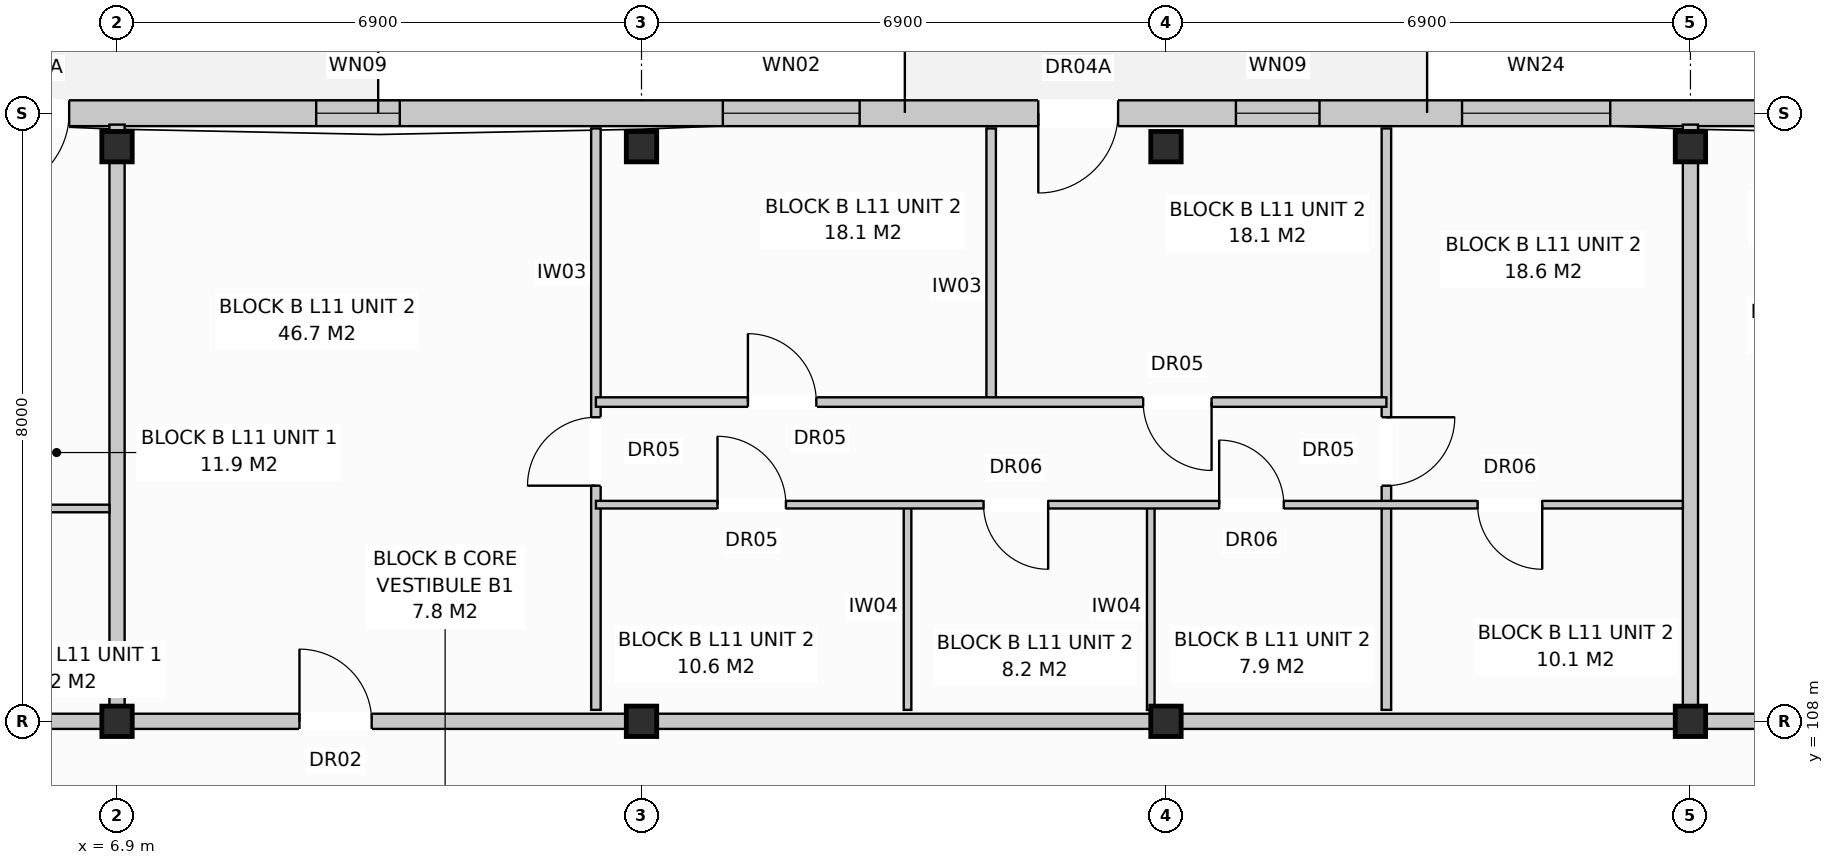
"""IFC4 building model, lengths in metres.
Left out: names, types, materials, properties, quantities, classifications, styles, units other than length and angle.
Written with IfcOpenShell. Run it as: python <this file> out.ifc"""

import sys

from ifc_helpers import new_model, si_unit, direction, frame, frame_2d, origin, origin_with_axes, origin_2d, place, context, subcontext, project, spatial, rectangle, extrude, element, fill, save


model = new_model("IFC4")
c1 = context("Model", 3, precision=1e-05, world=origin(), true_north=direction((0.0, 1.0)))
c2 = subcontext(c1, "Body", "Model", "MODEL_VIEW")
j1 = project(units=[si_unit("LENGTHUNIT", "METRE"), si_unit("PLANEANGLEUNIT", "RADIAN")], contexts=[c1])
p1 = place(None, origin())
s1 = spatial("IfcSite", under=j1, at=p1, CompositionType="ELEMENT")
p2 = place(p1, origin())
s2 = spatial("IfcBuilding", under=s1, at=p2, CompositionType="ELEMENT")
p3 = place(p2, frame((0.0, 0.0, 36.8)))
s3 = spatial("IfcBuildingStorey", under=s2, at=p3, CompositionType="ELEMENT", Elevation=36.8)
for number, where, z_axis, x_axis in (
    (1, (6.9, 108.0, 0.0), (0.0, 0.0, 1.0), (1.0, 0.0, 0.0)),
    (2, (6.9, 115.56, 0.0), (0.0, 0.0, 1.0), (1.0, 0.0, 0.0)),
    (3, (13.8, 108.0, 0.0), (0.0, 0.0, 1.0), (1.0, 0.0, 0.0)),
    (4, (13.8, 115.56, 0.0), (0.0, 0.0, 1.0), (1.0, 0.0, 0.0)),
    (5, (20.7, 108.0, 0.0), (0.0, 0.0, 1.0), (1.0, 0.0, 0.0)),
    (6, (20.7, 115.56, 0.0), (0.0, 0.0, 1.0), (1.0, 0.0, 0.0)),
    (7, (27.6, 108.0, 0.0), (0.0, 0.0, 1.0), (1.0, 0.0, 0.0)),
    (8, (27.6, 115.56, 0.0), (0.0, 0.0, 1.0), (1.0, 0.0, 0.0)),
):
    element("IfcColumn", number, at=place(p3, frame(where, z_axis=z_axis, x_axis=x_axis)), inside=s3, PredefinedType="COLUMN", context=c2, shape_type="SweptSolid", body=[
        extrude(rectangle(XDim=0.4, YDim=0.4, at=origin_2d()), origin(), (0.0, 0.0, 1.0), 3.2),
    ])
p4 = place(p3, frame((0.16, 116.0, 0.0), z_axis=(0.0, 0.0, 1.0), x_axis=(1.0, 0.0, 0.0)))
e9 = element("IfcWall", 9, at=p4, inside=s3, PredefinedType="STANDARD", context=c2, shape_type="SweptSolid", body=[
    extrude(rectangle(XDim=41.08, YDim=0.34, at=frame_2d((20.54, 0.0))), origin(), (0.0, 0.0, 1.0), 2.97),
])
p5 = place(p4, frame((5.06, 0.0, 0.0)))
e10 = element("IfcOpeningElement", 10, at=p5, cuts=e9, PredefinedType="OPENING", context=c2, shape_type="SweptSolid", body=[
    extrude(rectangle(XDim=1.05, YDim=2.12, at=frame_2d((0.525, 1.06))), frame((0.0, 0.182, 0.0), z_axis=(0.0, -1.0, 0.0), x_axis=(1.0, 0.0, 0.0)), (0.0, 0.0, 1.0), 0.364),
])
p6 = place(p4, frame((18.86, 0.0, 0.0)))
e11 = element("IfcOpeningElement", 11, at=p6, cuts=e9, PredefinedType="OPENING", context=c2, shape_type="SweptSolid", body=[
    extrude(rectangle(XDim=1.05, YDim=2.12, at=frame_2d((0.525, 1.06))), frame((0.0, 0.182, 0.0), z_axis=(0.0, -1.0, 0.0), x_axis=(1.0, 0.0, 0.0)), (0.0, 0.0, 1.0), 0.364),
])
p7 = place(p4, frame((31.375, 0.0, 0.0)))
e12 = element("IfcOpeningElement", 12, at=p7, cuts=e9, PredefinedType="OPENING", context=c2, shape_type="SweptSolid", body=[
    extrude(rectangle(XDim=1.05, YDim=2.12, at=frame_2d((0.525, 1.06))), frame((0.0, 0.182, 0.0), z_axis=(0.0, -1.0, 0.0), x_axis=(1.0, 0.0, 0.0)), (0.0, 0.0, 1.0), 0.364),
])
p8 = place(p4, frame((1.06, 0.0, 0.8)))
e13 = element("IfcOpeningElement", 13, at=p8, cuts=e9, PredefinedType="OPENING", context=c2, shape_type="SweptSolid", body=[
    extrude(rectangle(XDim=1.9, YDim=1.85, at=frame_2d((0.95, 0.925))), frame((0.0, 0.182, 0.0), z_axis=(0.0, -1.0, 0.0), x_axis=(1.0, 0.0, 0.0)), (0.0, 0.0, 1.0), 0.364),
])
p9 = place(p4, frame((9.36, 0.0, 0.72)))
e14 = element("IfcOpeningElement", 14, at=p9, cuts=e9, PredefinedType="OPENING", context=c2, shape_type="SweptSolid", body=[
    extrude(rectangle(XDim=1.1, YDim=1.5, at=frame_2d((0.55, 0.75))), frame((0.0, 0.182, 0.0), z_axis=(0.0, -1.0, 0.0), x_axis=(1.0, 0.0, 0.0)), (0.0, 0.0, 1.0), 0.364),
])
p10 = place(p4, frame((14.71, 0.0, 0.8)))
e15 = element("IfcOpeningElement", 15, at=p10, cuts=e9, PredefinedType="OPENING", context=c2, shape_type="SweptSolid", body=[
    extrude(rectangle(XDim=1.8, YDim=1.7, at=frame_2d((0.9, 0.85))), frame((0.0, 0.182, 0.0), z_axis=(0.0, -1.0, 0.0), x_axis=(1.0, 0.0, 0.0)), (0.0, 0.0, 1.0), 0.364),
])
p11 = place(p4, frame((21.46, 0.0, 0.72)))
e16 = element("IfcOpeningElement", 16, at=p11, cuts=e9, PredefinedType="OPENING", context=c2, shape_type="SweptSolid", body=[
    extrude(rectangle(XDim=1.1, YDim=1.5, at=frame_2d((0.55, 0.75))), frame((0.0, 0.182, 0.0), z_axis=(0.0, -1.0, 0.0), x_axis=(1.0, 0.0, 0.0)), (0.0, 0.0, 1.0), 0.364),
])
p12 = place(p4, frame((24.435, 0.0, 0.8)))
e17 = element("IfcOpeningElement", 17, at=p12, cuts=e9, PredefinedType="OPENING", context=c2, shape_type="SweptSolid", body=[
    extrude(rectangle(XDim=1.95, YDim=1.65, at=frame_2d((0.975, 0.825))), frame((0.0, 0.182, 0.0), z_axis=(0.0, -1.0, 0.0), x_axis=(1.0, 0.0, 0.0)), (0.0, 0.0, 1.0), 0.364),
])
p13 = place(p4, frame((29.21, 0.0, 0.8)))
e18 = element("IfcOpeningElement", 18, at=p13, cuts=e9, PredefinedType="OPENING", context=c2, shape_type="SweptSolid", body=[
    extrude(rectangle(XDim=1.8, YDim=1.7, at=frame_2d((0.9, 0.85))), frame((0.0, 0.182, 0.0), z_axis=(0.0, -1.0, 0.0), x_axis=(1.0, 0.0, 0.0)), (0.0, 0.0, 1.0), 0.364),
])
p14 = place(p4, frame((35.26, 0.0, 0.72)))
e19 = element("IfcOpeningElement", 19, at=p14, cuts=e9, PredefinedType="OPENING", context=c2, shape_type="SweptSolid", body=[
    extrude(rectangle(XDim=1.1, YDim=1.5, at=frame_2d((0.55, 0.75))), frame((0.0, 0.182, 0.0), z_axis=(0.0, -1.0, 0.0), x_axis=(1.0, 0.0, 0.0)), (0.0, 0.0, 1.0), 0.364),
])
p15 = place(p4, frame((38.035, 0.0, 0.8)))
e20 = element("IfcOpeningElement", 20, at=p15, cuts=e9, PredefinedType="OPENING", context=c2, shape_type="SweptSolid", body=[
    extrude(rectangle(XDim=1.95, YDim=1.65, at=frame_2d((0.975, 0.825))), frame((0.0, 0.182, 0.0), z_axis=(0.0, -1.0, 0.0), x_axis=(1.0, 0.0, 0.0)), (0.0, 0.0, 1.0), 0.364),
])
p16 = place(p3, frame((6.9, 108.15, 0.0), z_axis=(0.0, 0.0, 1.0), x_axis=(0.0, 1.0, 0.0)))
e21 = element("IfcWall", 21, at=p16, inside=s3, PredefinedType="PARTITIONING", context=c2, shape_type="SweptSolid", body=[
    extrude(rectangle(XDim=7.7, YDim=0.2, at=frame_2d((3.85, 0.0))), origin(), (0.0, 0.0, 1.0), 2.41),
])
p17 = place(p3, frame((0.0, 108.0, 0.0), z_axis=(0.0, 0.0, 1.0), x_axis=(1.0, 0.0, 0.0)))
e22 = element("IfcWall", 22, at=p17, inside=s3, PredefinedType="PARTITIONING", context=c2, shape_type="SweptSolid", body=[
    extrude(rectangle(XDim=6.9, YDim=0.2, at=frame_2d((3.45, 0.0))), origin(), (0.0, 0.0, 1.0), 2.41),
])
p18 = place(p17, frame((2.0, 0.0, 0.0)))
e23 = element("IfcOpeningElement", 23, at=p18, cuts=e22, PredefinedType="OPENING", context=c2, shape_type="SweptSolid", body=[
    extrude(rectangle(XDim=0.95, YDim=2.15, at=frame_2d((0.475, 1.075))), frame((0.0, 0.112, 0.0), z_axis=(0.0, -1.0, 0.0), x_axis=(1.0, 0.0, 0.0)), (0.0, 0.0, 1.0), 0.224),
])
p19 = place(p3, frame((4.3, 110.8, 0.0), z_axis=(0.0, 0.0, 1.0), x_axis=(1.0, 0.0, 0.0)))
e24 = element("IfcWall", 24, at=p19, inside=s3, PredefinedType="PARTITIONING", context=c2, shape_type="SweptSolid", body=[
    extrude(rectangle(XDim=2.5, YDim=0.1, at=frame_2d((1.25, 0.0))), origin(), (0.0, 0.0, 1.0), 2.97),
])
p20 = place(p3, frame((27.6, 108.15, 0.0), z_axis=(0.0, 0.0, 1.0), x_axis=(0.0, 1.0, 0.0)))
e25 = element("IfcWall", 25, at=p20, inside=s3, PredefinedType="PARTITIONING", context=c2, shape_type="SweptSolid", body=[
    extrude(rectangle(XDim=7.7, YDim=0.2, at=frame_2d((3.85, 0.0))), origin(), (0.0, 0.0, 1.0), 2.97),
])
p21 = place(p3, frame((6.9, 108.0, 0.0), z_axis=(0.0, 0.0, 1.0), x_axis=(1.0, 0.0, 0.0)))
e26 = element("IfcWall", 26, at=p21, inside=s3, PredefinedType="PARTITIONING", context=c2, shape_type="SweptSolid", body=[
    extrude(rectangle(XDim=20.7, YDim=0.2, at=frame_2d((10.35, 0.0))), origin(), (0.0, 0.0, 1.0), 2.41),
])
p22 = place(p21, frame((2.4, 0.0, 0.0)))
e27 = element("IfcOpeningElement", 27, at=p22, cuts=e26, PredefinedType="OPENING", context=c2, shape_type="SweptSolid", body=[
    extrude(rectangle(XDim=0.95, YDim=2.15, at=frame_2d((0.475, 1.075))), frame((0.0, 0.112, 0.0), z_axis=(0.0, -1.0, 0.0), x_axis=(1.0, 0.0, 0.0)), (0.0, 0.0, 1.0), 0.224),
])
p23 = place(p3, frame((13.2, 108.15, 0.0), z_axis=(0.0, 0.0, 1.0), x_axis=(0.0, 1.0, 0.0)))
e28 = element("IfcWall", 28, at=p23, inside=s3, PredefinedType="PARTITIONING", context=c2, shape_type="SweptSolid", body=[
    extrude(rectangle(XDim=7.65, YDim=0.125, at=frame_2d((3.825, 0.0))), origin(), (0.0, 0.0, 1.0), 2.97),
])
p24 = place(p23, frame((2.95, 0.0, 0.0)))
e29 = element("IfcOpeningElement", 29, at=p24, cuts=e28, PredefinedType="OPENING", context=c2, shape_type="SweptSolid", body=[
    extrude(rectangle(XDim=0.9, YDim=2.1, at=frame_2d((0.45, 1.05))), frame((0.0, 0.074, 0.0), z_axis=(0.0, -1.0, 0.0), x_axis=(1.0, 0.0, 0.0)), (0.0, 0.0, 1.0), 0.149),
])
for number, where, z_axis, x_axis in (
    (30, (17.3, 108.15, 0.0), (0.0, 0.0, 1.0), (0.0, 1.0, 0.0)),
    (31, (20.5, 108.15, 0.0), (0.0, 0.0, 1.0), (0.0, 1.0, 0.0)),
):
    element("IfcWall", number, at=place(p3, frame(where, z_axis=z_axis, x_axis=x_axis)), inside=s3, PredefinedType="PARTITIONING", context=c2, shape_type="SweptSolid", body=[
        extrude(rectangle(XDim=2.7, YDim=0.1, at=frame_2d((1.35, 0.0))), origin(), (0.0, 0.0, 1.0), 2.97),
    ])
p25 = place(p3, frame((18.4, 112.2, 0.0), z_axis=(0.0, 0.0, 1.0), x_axis=(0.0, 1.0, 0.0)))
e32 = element("IfcWall", 32, at=p25, inside=s3, PredefinedType="PARTITIONING", context=c2, shape_type="SweptSolid", body=[
    extrude(rectangle(XDim=3.6, YDim=0.125, at=frame_2d((1.8, 0.0))), origin(), (0.0, 0.0, 1.0), 2.59),
])
p26 = place(p3, frame((23.6, 108.15, 0.0), z_axis=(0.0, 0.0, 1.0), x_axis=(0.0, 1.0, 0.0)))
e33 = element("IfcWall", 33, at=p26, inside=s3, PredefinedType="PARTITIONING", context=c2, shape_type="SweptSolid", body=[
    extrude(rectangle(XDim=7.65, YDim=0.125, at=frame_2d((3.825, 0.0))), origin(), (0.0, 0.0, 1.0), 2.97),
])
p27 = place(p26, frame((2.95, 0.0, 0.0)))
e34 = element("IfcOpeningElement", 34, at=p27, cuts=e33, PredefinedType="OPENING", context=c2, shape_type="SweptSolid", body=[
    extrude(rectangle(XDim=0.9, YDim=2.1, at=frame_2d((0.45, 1.05))), frame((0.0, 0.074, 0.0), z_axis=(0.0, -1.0, 0.0), x_axis=(1.0, 0.0, 0.0)), (0.0, 0.0, 1.0), 0.149),
])
p28 = place(p3, frame((13.2, 110.85, 0.0), z_axis=(0.0, 0.0, 1.0), x_axis=(1.0, 0.0, 0.0)))
e35 = element("IfcWall", 35, at=p28, inside=s3, PredefinedType="PARTITIONING", context=c2, shape_type="SweptSolid", body=[
    extrude(rectangle(XDim=14.3, YDim=0.1, at=frame_2d((7.15, 0.0))), origin(), (0.0, 0.0, 1.0), 2.97),
])
p29 = place(p28, frame((1.6, 0.0, 0.0)))
e36 = element("IfcOpeningElement", 36, at=p29, cuts=e35, PredefinedType="OPENING", context=c2, shape_type="SweptSolid", body=[
    extrude(rectangle(XDim=0.9, YDim=2.1, at=frame_2d((0.45, 1.05))), frame((0.0, 0.062, 0.0), z_axis=(0.0, -1.0, 0.0), x_axis=(1.0, 0.0, 0.0)), (0.0, 0.0, 1.0), 0.124),
])
p30 = place(p28, frame((5.1, 0.0, 0.0)))
e37 = element("IfcOpeningElement", 37, at=p30, cuts=e35, PredefinedType="OPENING", context=c2, shape_type="SweptSolid", body=[
    extrude(rectangle(XDim=0.85, YDim=2.05, at=frame_2d((0.425, 1.025))), frame((0.0, 0.062, 0.0), z_axis=(0.0, -1.0, 0.0), x_axis=(1.0, 0.0, 0.0)), (0.0, 0.0, 1.0), 0.124),
])
p31 = place(p28, frame((8.2, 0.0, 0.0)))
e38 = element("IfcOpeningElement", 38, at=p31, cuts=e35, PredefinedType="OPENING", context=c2, shape_type="SweptSolid", body=[
    extrude(rectangle(XDim=0.85, YDim=2.05, at=frame_2d((0.425, 1.025))), frame((0.0, 0.062, 0.0), z_axis=(0.0, -1.0, 0.0), x_axis=(1.0, 0.0, 0.0)), (0.0, 0.0, 1.0), 0.124),
])
p32 = place(p28, frame((11.6, 0.0, 0.0)))
e39 = element("IfcOpeningElement", 39, at=p32, cuts=e35, PredefinedType="OPENING", context=c2, shape_type="SweptSolid", body=[
    extrude(rectangle(XDim=0.85, YDim=2.05, at=frame_2d((0.425, 1.025))), frame((0.0, 0.062, 0.0), z_axis=(0.0, -1.0, 0.0), x_axis=(1.0, 0.0, 0.0)), (0.0, 0.0, 1.0), 0.124),
])
p33 = place(p3, frame((13.2, 112.2, 0.0), z_axis=(0.0, 0.0, 1.0), x_axis=(1.0, 0.0, 0.0)))
e40 = element("IfcWall", 40, at=p33, inside=s3, PredefinedType="PARTITIONING", context=c2, shape_type="SweptSolid", body=[
    extrude(rectangle(XDim=10.4, YDim=0.125, at=frame_2d((5.2, 0.0))), origin(), (0.0, 0.0, 1.0), 2.97),
])
p34 = place(p33, frame((2.0, 0.0, 0.0)))
e41 = element("IfcOpeningElement", 41, at=p34, cuts=e40, PredefinedType="OPENING", context=c2, shape_type="SweptSolid", body=[
    extrude(rectangle(XDim=0.9, YDim=2.1, at=frame_2d((0.45, 1.05))), frame((0.0, 0.074, 0.0), z_axis=(0.0, -1.0, 0.0), x_axis=(1.0, 0.0, 0.0)), (0.0, 0.0, 1.0), 0.149),
])
p35 = place(p33, frame((7.2, 0.0, 0.0)))
e42 = element("IfcOpeningElement", 42, at=p35, cuts=e40, PredefinedType="OPENING", context=c2, shape_type="SweptSolid", body=[
    extrude(rectangle(XDim=0.9, YDim=2.1, at=frame_2d((0.45, 1.05))), frame((0.0, 0.074, 0.0), z_axis=(0.0, -1.0, 0.0), x_axis=(1.0, 0.0, 0.0)), (0.0, 0.0, 1.0), 0.149),
])
p36 = place(p3, frame((27.6, 108.0, 0.0), z_axis=(0.0, 0.0, 1.0), x_axis=(1.0, 0.0, 0.0)))
e43 = element("IfcWall", 43, at=p36, inside=s3, PredefinedType="PARTITIONING", context=c2, shape_type="SweptSolid", body=[
    extrude(rectangle(XDim=13.8, YDim=0.2, at=frame_2d((6.9, 0.0))), origin(), (0.0, 0.0, 1.0), 2.41),
])
p37 = place(p36, frame((2.4, 0.0, 0.0)))
e44 = element("IfcOpeningElement", 44, at=p37, cuts=e43, PredefinedType="OPENING", context=c2, shape_type="SweptSolid", body=[
    extrude(rectangle(XDim=0.95, YDim=2.15, at=frame_2d((0.475, 1.075))), frame((0.0, 0.112, 0.0), z_axis=(0.0, -1.0, 0.0), x_axis=(1.0, 0.0, 0.0)), (0.0, 0.0, 1.0), 0.224),
])
p38 = place(p5, frame((1.05, 0.0, 0.0), z_axis=(0.0, 0.0, 1.0), x_axis=(-1.0, 0.0, 0.0)))
e45 = element("IfcDoor", 45, at=p38, inside=s3, OperationType="SINGLE_SWING_LEFT", PredefinedType="DOOR", context=c2, shape_type="SweptSolid", body=[
    extrude(rectangle(XDim=1.05, YDim=2.12, at=frame_2d((0.525, 1.06))), frame((0.0, 0.025, 0.0), z_axis=(0.0, -1.0, 0.0), x_axis=(1.0, 0.0, 0.0)), (0.0, 0.0, 1.0), 0.05),
])
fill(e10, e45)
p39 = place(p6, frame((1.05, 0.0, 0.0), z_axis=(0.0, 0.0, 1.0), x_axis=(-1.0, 0.0, 0.0)))
e46 = element("IfcDoor", 46, at=p39, inside=s3, OperationType="SINGLE_SWING_LEFT", PredefinedType="DOOR", context=c2, shape_type="SweptSolid", body=[
    extrude(rectangle(XDim=1.05, YDim=2.12, at=frame_2d((0.525, 1.06))), frame((0.0, 0.025, 0.0), z_axis=(0.0, -1.0, 0.0), x_axis=(1.0, 0.0, 0.0)), (0.0, 0.0, 1.0), 0.05),
])
fill(e11, e46)
p40 = place(p9, origin_with_axes())
e47 = element("IfcWindow", 47, at=p40, inside=s3, PartitioningType="SINGLE_PANEL", PredefinedType="WINDOW", context=c2, shape_type="SweptSolid", body=[
    extrude(rectangle(XDim=1.1, YDim=1.5, at=frame_2d((0.55, 0.75))), frame((0.0, 0.03, 0.0), z_axis=(0.0, -1.0, 0.0), x_axis=(1.0, 0.0, 0.0)), (0.0, 0.0, 1.0), 0.06),
])
fill(e14, e47)
p41 = place(p10, origin_with_axes())
e48 = element("IfcWindow", 48, at=p41, inside=s3, PartitioningType="SINGLE_PANEL", PredefinedType="WINDOW", context=c2, shape_type="SweptSolid", body=[
    extrude(rectangle(XDim=1.8, YDim=1.7, at=frame_2d((0.9, 0.85))), frame((0.0, 0.03, 0.0), z_axis=(0.0, -1.0, 0.0), x_axis=(1.0, 0.0, 0.0)), (0.0, 0.0, 1.0), 0.06),
])
fill(e15, e48)
p42 = place(p11, origin_with_axes())
e49 = element("IfcWindow", 49, at=p42, inside=s3, PartitioningType="SINGLE_PANEL", PredefinedType="WINDOW", context=c2, shape_type="SweptSolid", body=[
    extrude(rectangle(XDim=1.1, YDim=1.5, at=frame_2d((0.55, 0.75))), frame((0.0, 0.03, 0.0), z_axis=(0.0, -1.0, 0.0), x_axis=(1.0, 0.0, 0.0)), (0.0, 0.0, 1.0), 0.06),
])
fill(e16, e49)
p43 = place(p12, origin_with_axes())
e50 = element("IfcWindow", 50, at=p43, inside=s3, PartitioningType="SINGLE_PANEL", PredefinedType="WINDOW", context=c2, shape_type="SweptSolid", body=[
    extrude(rectangle(XDim=1.95, YDim=1.65, at=frame_2d((0.975, 0.825))), frame((0.0, 0.03, 0.0), z_axis=(0.0, -1.0, 0.0), x_axis=(1.0, 0.0, 0.0)), (0.0, 0.0, 1.0), 0.06),
])
fill(e17, e50)
p44 = place(p22, origin_with_axes())
e51 = element("IfcDoor", 51, at=p44, inside=s3, OperationType="SINGLE_SWING_LEFT", PredefinedType="DOOR", context=c2, shape_type="SweptSolid", body=[
    extrude(rectangle(XDim=0.95, YDim=2.15, at=frame_2d((0.475, 1.075))), frame((0.0, 0.025, 0.0), z_axis=(0.0, -1.0, 0.0), x_axis=(1.0, 0.0, 0.0)), (0.0, 0.0, 1.0), 0.05),
])
fill(e27, e51)
p45 = place(p24, origin_with_axes())
e52 = element("IfcDoor", 52, at=p45, inside=s3, OperationType="SINGLE_SWING_LEFT", PredefinedType="DOOR", context=c2, shape_type="SweptSolid", body=[
    extrude(rectangle(XDim=0.9, YDim=2.1, at=frame_2d((0.45, 1.05))), frame((0.0, 0.025, 0.0), z_axis=(0.0, -1.0, 0.0), x_axis=(1.0, 0.0, 0.0)), (0.0, 0.0, 1.0), 0.05),
])
fill(e29, e52)
p46 = place(p27, frame((0.9, 0.0, 0.0), z_axis=(0.0, 0.0, 1.0), x_axis=(-1.0, 0.0, 0.0)))
e53 = element("IfcDoor", 53, at=p46, inside=s3, OperationType="SINGLE_SWING_RIGHT", PredefinedType="DOOR", context=c2, shape_type="SweptSolid", body=[
    extrude(rectangle(XDim=0.9, YDim=2.1, at=frame_2d((0.45, 1.05))), frame((0.0, 0.025, 0.0), z_axis=(0.0, -1.0, 0.0), x_axis=(1.0, 0.0, 0.0)), (0.0, 0.0, 1.0), 0.05),
])
fill(e34, e53)
p47 = place(p29, origin_with_axes())
e54 = element("IfcDoor", 54, at=p47, inside=s3, OperationType="SINGLE_SWING_LEFT", PredefinedType="DOOR", context=c2, shape_type="SweptSolid", body=[
    extrude(rectangle(XDim=0.9, YDim=2.1, at=frame_2d((0.45, 1.05))), frame((0.0, 0.025, 0.0), z_axis=(0.0, -1.0, 0.0), x_axis=(1.0, 0.0, 0.0)), (0.0, 0.0, 1.0), 0.05),
])
fill(e36, e54)
p48 = place(p30, frame((0.85, 0.0, 0.0), z_axis=(0.0, 0.0, 1.0), x_axis=(-1.0, 0.0, 0.0)))
e55 = element("IfcDoor", 55, at=p48, inside=s3, OperationType="SINGLE_SWING_RIGHT", PredefinedType="DOOR", context=c2, shape_type="SweptSolid", body=[
    extrude(rectangle(XDim=0.85, YDim=2.05, at=frame_2d((0.425, 1.025))), frame((0.0, 0.025, 0.0), z_axis=(0.0, -1.0, 0.0), x_axis=(1.0, 0.0, 0.0)), (0.0, 0.0, 1.0), 0.05),
])
fill(e37, e55)
p49 = place(p31, origin_with_axes())
e56 = element("IfcDoor", 56, at=p49, inside=s3, OperationType="SINGLE_SWING_LEFT", PredefinedType="DOOR", context=c2, shape_type="SweptSolid", body=[
    extrude(rectangle(XDim=0.85, YDim=2.05, at=frame_2d((0.425, 1.025))), frame((0.0, 0.025, 0.0), z_axis=(0.0, -1.0, 0.0), x_axis=(1.0, 0.0, 0.0)), (0.0, 0.0, 1.0), 0.05),
])
fill(e38, e56)
p50 = place(p32, frame((0.85, 0.0, 0.0), z_axis=(0.0, 0.0, 1.0), x_axis=(-1.0, 0.0, 0.0)))
e57 = element("IfcDoor", 57, at=p50, inside=s3, OperationType="SINGLE_SWING_RIGHT", PredefinedType="DOOR", context=c2, shape_type="SweptSolid", body=[
    extrude(rectangle(XDim=0.85, YDim=2.05, at=frame_2d((0.425, 1.025))), frame((0.0, 0.025, 0.0), z_axis=(0.0, -1.0, 0.0), x_axis=(1.0, 0.0, 0.0)), (0.0, 0.0, 1.0), 0.05),
])
fill(e39, e57)
p51 = place(p34, origin_with_axes())
e58 = element("IfcDoor", 58, at=p51, inside=s3, OperationType="SINGLE_SWING_LEFT", PredefinedType="DOOR", context=c2, shape_type="SweptSolid", body=[
    extrude(rectangle(XDim=0.9, YDim=2.1, at=frame_2d((0.45, 1.05))), frame((0.0, 0.025, 0.0), z_axis=(0.0, -1.0, 0.0), x_axis=(1.0, 0.0, 0.0)), (0.0, 0.0, 1.0), 0.05),
])
fill(e41, e58)
p52 = place(p35, frame((0.9, 0.0, 0.0), z_axis=(0.0, 0.0, 1.0), x_axis=(-1.0, 0.0, 0.0)))
e59 = element("IfcDoor", 59, at=p52, inside=s3, OperationType="SINGLE_SWING_RIGHT", PredefinedType="DOOR", context=c2, shape_type="SweptSolid", body=[
    extrude(rectangle(XDim=0.9, YDim=2.1, at=frame_2d((0.45, 1.05))), frame((0.0, 0.025, 0.0), z_axis=(0.0, -1.0, 0.0), x_axis=(1.0, 0.0, 0.0)), (0.0, 0.0, 1.0), 0.05),
])
fill(e42, e59)
save(model, sys.argv[1])
